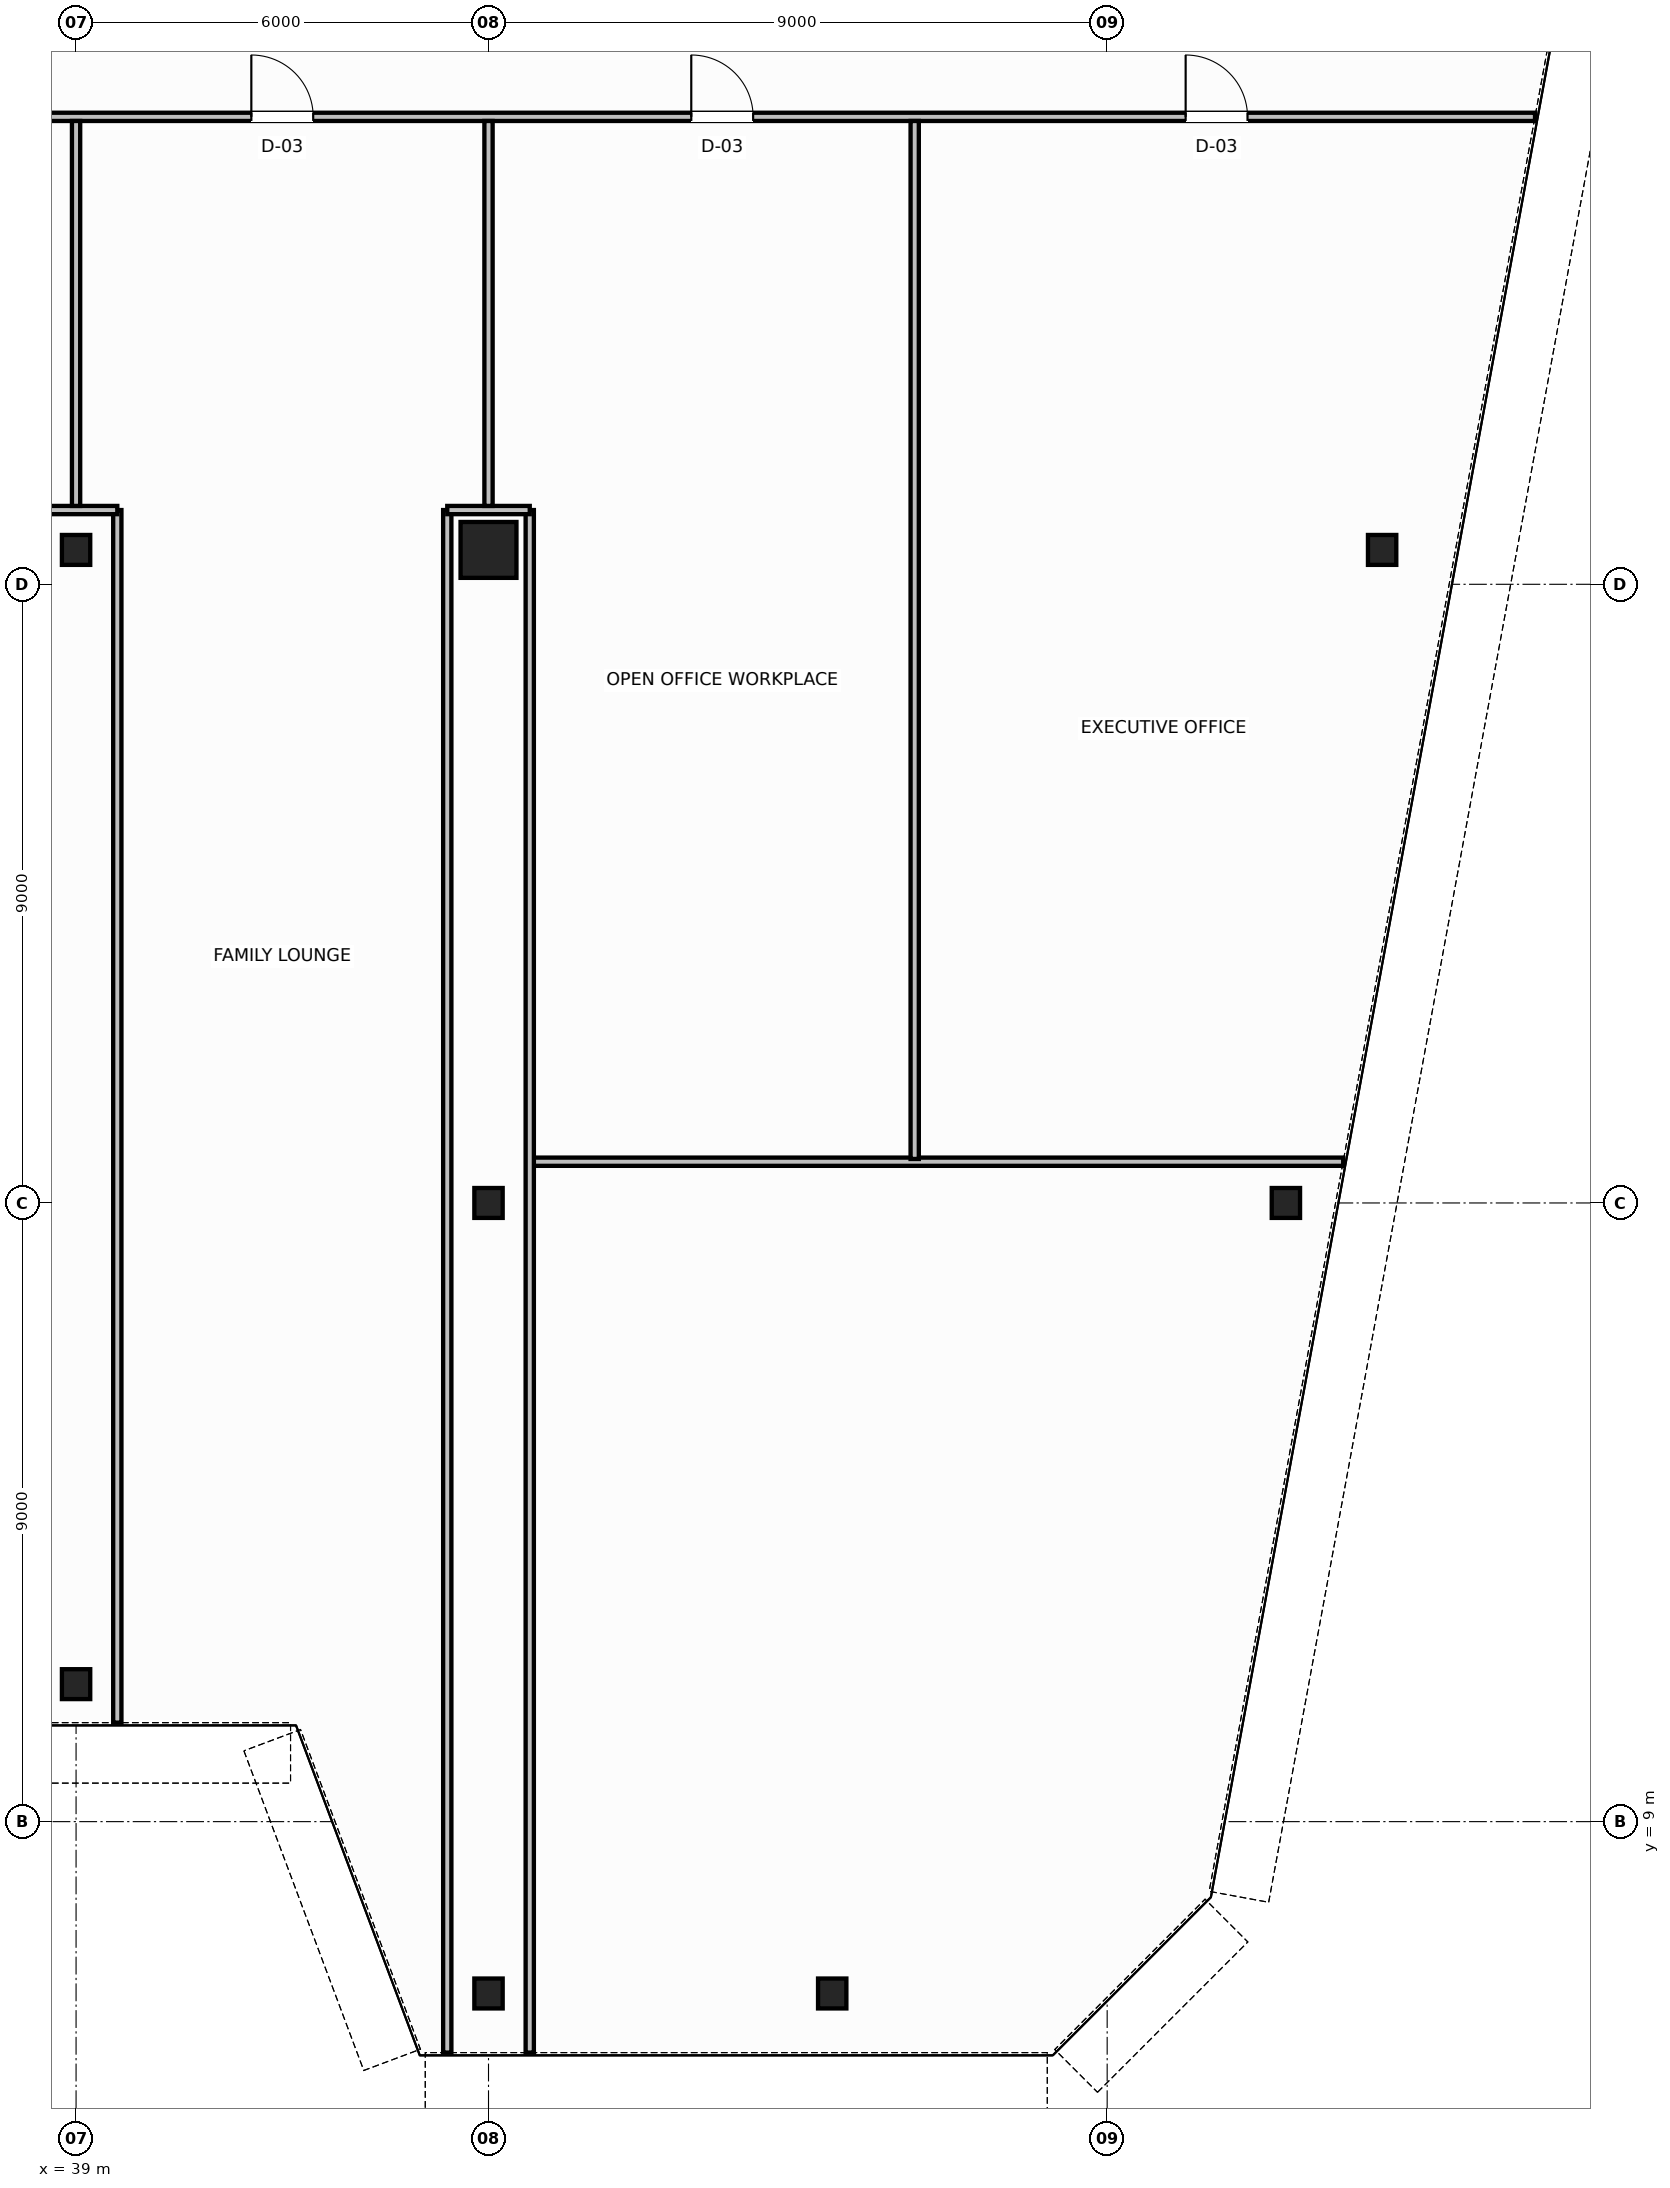
"""IFC4 building model, lengths in metres.
Left out: names, types, materials, properties, quantities, classifications, styles, units other than length and angle.
Written with IfcOpenShell. Run it as: python <this file> out.ifc"""

import sys

from ifc_helpers import new_model, si_unit, direction, frame, frame_2d, origin, origin_2d, place, context, subcontext, project, spatial, rectangle, hollow_circle, i_section, extrude, source, transform, mapped, element, fill, save


model = new_model("IFC4")
c1 = context("Model", 3, precision=1e-05, world=origin(), true_north=direction((0.0, 1.0)))
c2 = subcontext(c1, "Body", "Model", "MODEL_VIEW")
j1 = project(units=[si_unit("LENGTHUNIT", "METRE"), si_unit("PLANEANGLEUNIT", "RADIAN")], contexts=[c1])
p1 = place(None, origin())
s1 = spatial("IfcSite", under=j1, at=p1, CompositionType="ELEMENT")
p2 = place(p1, origin())
s2 = spatial("IfcBuilding", under=s1, at=p2, CompositionType="ELEMENT")
p3 = place(p2, frame((0.0, 0.0, 203.2)))
s3 = spatial("IfcBuildingStorey", under=s2, at=p3, CompositionType="ELEMENT", Elevation=203.2)
m1 = source(origin(), c2, "Body", "SweptSolid", [
    extrude(i_section(OverallWidth=0.412, OverallDepth=0.435, WebThickness=0.036, FlangeThickness=0.05, FilletRadius=0.015, at=origin_2d()), origin(), (0.0, 0.0, 1.0), 3.8),
])
for number, where, z_axis, x_axis in (
    (1, (58.0, 27.5, 0.0), (0.0, 0.0, 1.0), (1.0, 0.0, 0.0)),
    (2, (56.6, 18.0, 0.0), (0.0, 0.0, 1.0), (1.0, 0.0, 0.0)),
):
    element("IfcColumn", number, at=place(p3, frame(where, z_axis=z_axis, x_axis=x_axis)), inside=s3, PredefinedType="COLUMN", context=c2, shape_type="MappedRepresentation", body=[
        mapped(m1, transform((0.0, 0.0, 0.0), scale=1.0)),
    ])
m2 = source(origin(), c2, "Body", "SweptSolid", [
    extrude(i_section(OverallWidth=0.412, OverallDepth=0.435, WebThickness=0.036, FlangeThickness=0.05, FilletRadius=0.015, at=origin_2d()), origin(), (0.0, 0.0, 1.0), 3.8),
])
p4 = place(p3, frame((39.0, 27.5, 0.0), z_axis=(0.0, 0.0, 1.0), x_axis=(1.0, 0.0, 0.0)))
e3 = element("IfcColumn", 3, at=p4, inside=s3, PredefinedType="COLUMN", context=c2, shape_type="MappedRepresentation", body=[
    mapped(m2, transform((0.0, 0.0, 0.0), scale=1.0)),
])
m3 = source(origin(), c2, "Body", "SweptSolid", [
    extrude(hollow_circle(Radius=0.406, WallThickness=0.04, at=origin_2d()), origin(), (0.0, 0.0, 1.0), 3.8),
])
p5 = place(p3, frame((45.0, 27.5, 0.0), z_axis=(0.0, 0.0, 1.0), x_axis=(1.0, 0.0, 0.0)))
e4 = element("IfcColumn", 4, at=p5, inside=s3, PredefinedType="COLUMN", context=c2, shape_type="MappedRepresentation", body=[
    mapped(m3, transform((0.0, 0.0, 0.0), scale=1.0)),
])
for number, where, z_axis, x_axis in (
    (5, (45.0, 18.0, 0.0), (0.0, 0.0, 1.0), (1.0, 0.0, 0.0)),
    (6, (39.0, 11.0, 0.0), (0.0, 0.0, 1.0), (1.0, 0.0, 0.0)),
    (7, (45.0, 6.5, 0.0), (0.0, 0.0, 1.0), (1.0, 0.0, 0.0)),
    (8, (50.0, 6.5, 0.0), (0.0, 0.0, 1.0), (1.0, 0.0, 0.0)),
):
    element("IfcColumn", number, at=place(p3, frame(where, z_axis=z_axis, x_axis=x_axis)), inside=s3, PredefinedType="COLUMN", context=c2, shape_type="MappedRepresentation", body=[
        mapped(m2, transform((0.0, 0.0, 0.0), scale=1.0)),
    ])
p6 = place(p3, frame((7.776, 33.8, 0.0), z_axis=(0.0, 0.0, 1.0), x_axis=(1.0, 0.0, 0.0)))
e9 = element("IfcWall", 9, at=p6, inside=s3, PredefinedType="PARTITIONING", context=c2, shape_type="SweptSolid", body=[
    extrude(rectangle(XDim=52.449, YDim=0.12, at=frame_2d((26.224, 0.0))), origin(), (0.0, 0.0, 1.0), 3.58),
])
p7 = place(p6, frame((4.082, 0.0, 0.0)))
e10 = element("IfcOpeningElement", 10, at=p7, cuts=e9, PredefinedType="OPENING", context=c2, shape_type="SweptSolid", body=[
    extrude(rectangle(XDim=0.9, YDim=2.15, at=frame_2d((0.45, 1.075))), frame((0.0, 0.07, 0.0), z_axis=(0.0, -1.0, 0.0), x_axis=(1.0, 0.0, 0.0)), (0.0, 0.0, 1.0), 0.14),
])
p8 = place(p6, frame((11.274, 0.0, 0.0)))
e11 = element("IfcOpeningElement", 11, at=p8, cuts=e9, PredefinedType="OPENING", context=c2, shape_type="SweptSolid", body=[
    extrude(rectangle(XDim=0.9, YDim=2.15, at=frame_2d((0.45, 1.075))), frame((0.0, 0.07, 0.0), z_axis=(0.0, -1.0, 0.0), x_axis=(1.0, 0.0, 0.0)), (0.0, 0.0, 1.0), 0.14),
])
p9 = place(p6, frame((17.774, 0.0, 0.0)))
e12 = element("IfcOpeningElement", 12, at=p9, cuts=e9, PredefinedType="OPENING", context=c2, shape_type="SweptSolid", body=[
    extrude(rectangle(XDim=0.9, YDim=2.15, at=frame_2d((0.45, 1.075))), frame((0.0, 0.07, 0.0), z_axis=(0.0, -1.0, 0.0), x_axis=(1.0, 0.0, 0.0)), (0.0, 0.0, 1.0), 0.14),
])
p10 = place(p6, frame((25.774, 0.0, 0.0)))
e13 = element("IfcOpeningElement", 13, at=p10, cuts=e9, PredefinedType="OPENING", context=c2, shape_type="SweptSolid", body=[
    extrude(rectangle(XDim=0.9, YDim=2.15, at=frame_2d((0.45, 1.075))), frame((0.0, 0.07, 0.0), z_axis=(0.0, -1.0, 0.0), x_axis=(1.0, 0.0, 0.0)), (0.0, 0.0, 1.0), 0.14),
])
p11 = place(p6, frame((33.774, 0.0, 0.0)))
e14 = element("IfcOpeningElement", 14, at=p11, cuts=e9, PredefinedType="OPENING", context=c2, shape_type="SweptSolid", body=[
    extrude(rectangle(XDim=0.9, YDim=2.15, at=frame_2d((0.45, 1.075))), frame((0.0, 0.07, 0.0), z_axis=(0.0, -1.0, 0.0), x_axis=(1.0, 0.0, 0.0)), (0.0, 0.0, 1.0), 0.14),
])
p12 = place(p6, frame((40.174, 0.0, 0.0)))
e15 = element("IfcOpeningElement", 15, at=p12, cuts=e9, PredefinedType="OPENING", context=c2, shape_type="SweptSolid", body=[
    extrude(rectangle(XDim=0.9, YDim=2.15, at=frame_2d((0.45, 1.075))), frame((0.0, 0.07, 0.0), z_axis=(0.0, -1.0, 0.0), x_axis=(1.0, 0.0, 0.0)), (0.0, 0.0, 1.0), 0.14),
])
p13 = place(p6, frame((47.366, 0.0, 0.0)))
e16 = element("IfcOpeningElement", 16, at=p13, cuts=e9, PredefinedType="OPENING", context=c2, shape_type="SweptSolid", body=[
    extrude(rectangle(XDim=0.9, YDim=2.15, at=frame_2d((0.45, 1.075))), frame((0.0, 0.07, 0.0), z_axis=(0.0, -1.0, 0.0), x_axis=(1.0, 0.0, 0.0)), (0.0, 0.0, 1.0), 0.14),
])
p14 = place(p3, frame((45.64, 18.6, 0.0), z_axis=(0.0, 0.0, 1.0), x_axis=(1.0, 0.0, 0.0)))
e17 = element("IfcWall", 17, at=p14, inside=s3, PredefinedType="PARTITIONING", context=c2, shape_type="SweptSolid", body=[
    extrude(rectangle(XDim=11.794, YDim=0.12, at=frame_2d((5.897, 0.0))), origin(), (0.0, 0.0, 1.0), 3.58),
])
p15 = place(p3, frame((39.6, 10.44, 0.0), z_axis=(0.0, 0.0, 1.0), x_axis=(0.0, 1.0, 0.0)))
e18 = element("IfcWall", 18, at=p15, inside=s3, PredefinedType="PARTITIONING", context=c2, shape_type="SweptSolid", body=[
    extrude(rectangle(XDim=17.64, YDim=0.12, at=frame_2d((8.82, 0.0))), origin(), (0.0, 0.0, 1.0), 3.58),
])
p16 = place(p3, frame((38.4, 28.08, 0.0), z_axis=(0.0, 0.0, 1.0), x_axis=(1.0, 0.0, 0.0)))
e19 = element("IfcWall", 19, at=p16, inside=s3, PredefinedType="PARTITIONING", context=c2, shape_type="SweptSolid", body=[
    extrude(rectangle(XDim=1.2, YDim=0.12, at=frame_2d((0.6, 0.0))), origin(), (0.0, 0.0, 1.0), 3.58),
])
p17 = place(p3, frame((39.0, 28.14, 0.0), z_axis=(0.0, 0.0, 1.0), x_axis=(0.0, 1.0, 0.0)))
e20 = element("IfcWall", 20, at=p17, inside=s3, PredefinedType="PARTITIONING", context=c2, shape_type="SweptSolid", body=[
    extrude(rectangle(XDim=5.6, YDim=0.12, at=frame_2d((2.8, 0.0))), origin(), (0.0, 0.0, 1.0), 2.37),
])
for number, where, z_axis, x_axis in (
    (21, (44.4, 5.64, 0.0), (0.0, 0.0, 1.0), (0.0, 1.0, 0.0)),
    (22, (45.6, 5.64, 0.0), (0.0, 0.0, 1.0), (0.0, 1.0, 0.0)),
):
    element("IfcWall", number, at=place(p3, frame(where, z_axis=z_axis, x_axis=x_axis)), inside=s3, PredefinedType="PARTITIONING", context=c2, shape_type="SweptSolid", body=[
        extrude(rectangle(XDim=22.44, YDim=0.12, at=frame_2d((11.22, 0.0))), origin(), (0.0, 0.0, 1.0), 3.58),
    ])
p18 = place(p3, frame((44.4, 28.08, 0.0), z_axis=(0.0, 0.0, 1.0), x_axis=(1.0, 0.0, 0.0)))
e23 = element("IfcWall", 23, at=p18, inside=s3, PredefinedType="PARTITIONING", context=c2, shape_type="SweptSolid", body=[
    extrude(rectangle(XDim=1.2, YDim=0.12, at=frame_2d((0.6, 0.0))), origin(), (0.0, 0.0, 1.0), 3.58),
])
p19 = place(p3, frame((45.0, 28.14, 0.0), z_axis=(0.0, 0.0, 1.0), x_axis=(0.0, 1.0, 0.0)))
e24 = element("IfcWall", 24, at=p19, inside=s3, PredefinedType="PARTITIONING", context=c2, shape_type="SweptSolid", body=[
    extrude(rectangle(XDim=5.6, YDim=0.12, at=frame_2d((2.8, 0.0))), origin(), (0.0, 0.0, 1.0), 2.37),
])
p20 = place(p3, frame((51.2, 18.64, 0.0), z_axis=(0.0, 0.0, 1.0), x_axis=(0.0, 1.0, 0.0)))
e25 = element("IfcWall", 25, at=p20, inside=s3, PredefinedType="PARTITIONING", context=c2, shape_type="SweptSolid", body=[
    extrude(rectangle(XDim=15.1, YDim=0.12, at=frame_2d((7.55, 0.0))), origin(), (0.0, 0.0, 1.0), 3.58),
])
m4 = source(origin(), c2, "Body", "SweptSolid", [
    extrude(rectangle(XDim=0.9, YDim=2.15, at=frame_2d((0.45, 1.075))), frame((0.0, 0.025, 0.0), z_axis=(0.0, -1.0, 0.0), x_axis=(1.0, 0.0, 0.0)), (0.0, 0.0, 1.0), 0.05),
])
p21 = place(p11, origin())
e26 = element("IfcDoor", 26, at=p21, inside=s3, OperationType="SINGLE_SWING_LEFT", PredefinedType="DOOR", context=c2, shape_type="MappedRepresentation", body=[
    mapped(m4, transform((0.0, 0.0, 0.0), scale=1.0)),
])
fill(e14, e26)
p22 = place(p12, origin())
e27 = element("IfcDoor", 27, at=p22, inside=s3, OperationType="SINGLE_SWING_RIGHT", PredefinedType="DOOR", context=c2, shape_type="MappedRepresentation", body=[
    mapped(m4, transform((0.0, 0.0, 0.0), scale=1.0)),
])
fill(e15, e27)
p23 = place(p13, origin())
e28 = element("IfcDoor", 28, at=p23, inside=s3, OperationType="SINGLE_SWING_LEFT", PredefinedType="DOOR", context=c2, shape_type="MappedRepresentation", body=[
    mapped(m4, transform((0.0, 0.0, 0.0), scale=1.0)),
])
fill(e16, e28)
save(model, sys.argv[1])
